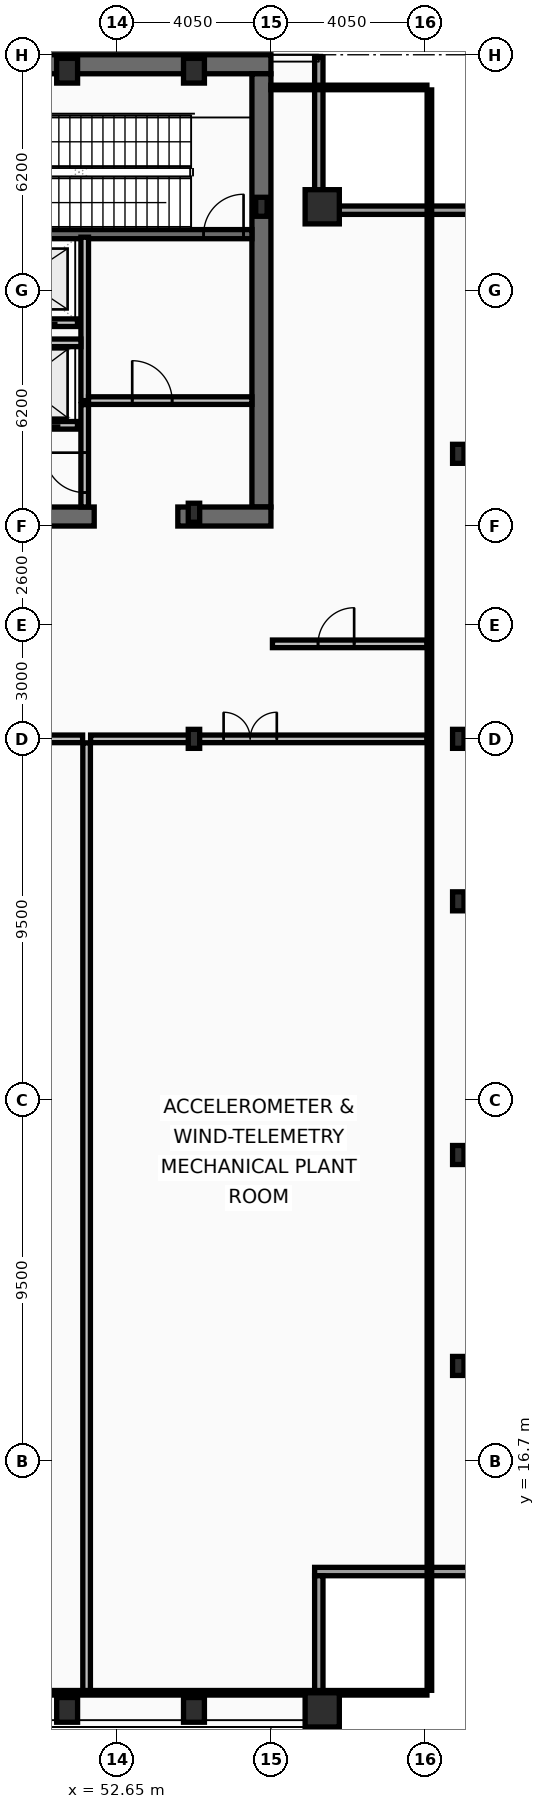
"""IFC4 building model, lengths in metres.
Left out: names, types, materials, properties, quantities, classifications, styles, units other than length and angle.
Written with IfcOpenShell. Run it as: python <this file> out.ifc"""

import sys

from ifc_helpers import new_model, si_unit, direction, frame, frame_2d, origin, origin_2d, place, context, subcontext, project, spatial, rectangle, hollow_rectangle, i_section, extrude, element, fill, save


model = new_model("IFC4")
c1 = context("Model", 3, precision=1e-05, world=origin(), true_north=direction((0.0, 1.0)))
c2 = subcontext(c1, "Body", "Model", "MODEL_VIEW")
j1 = project(units=[si_unit("LENGTHUNIT", "METRE"), si_unit("PLANEANGLEUNIT", "RADIAN")], contexts=[c1])
p1 = place(None, origin())
s1 = spatial("IfcSite", under=j1, at=p1, CompositionType="ELEMENT")
p2 = place(p1, origin())
s2 = spatial("IfcBuilding", under=s1, at=p2, CompositionType="ELEMENT")
p3 = place(p2, frame((0.0, 0.0, 356.2)))
s3 = spatial("IfcBuildingStorey", under=s2, at=p3, CompositionType="ELEMENT", Elevation=356.2)
p4 = place(p3, frame((16.2, 53.45, 0.0), z_axis=(0.0, 0.0, 1.0), x_axis=(1.0, 0.0, 0.0)))
e1 = element("IfcWall", 1, at=p4, inside=s3, PredefinedType="SHEAR", context=c2, shape_type="SweptSolid", body=[
    extrude(rectangle(XDim=40.5, YDim=0.5, at=frame_2d((20.25, 0.0))), origin(), (0.0, 0.0, 1.0), 5.4),
])
p5 = place(p3, frame((56.45, 53.2, 0.0), z_axis=(0.0, 0.0, 1.0), x_axis=(0.0, -1.0, 0.0)))
e2 = element("IfcWall", 2, at=p5, inside=s3, PredefinedType="SHEAR", context=c2, shape_type="SweptSolid", body=[
    extrude(rectangle(XDim=11.4, YDim=0.5, at=frame_2d((5.7, 0.0))), origin(), (0.0, 0.0, 1.0), 5.4),
])
p6 = place(p3, frame((52.05, 41.55, 0.0), z_axis=(0.0, 0.0, 1.0), x_axis=(-1.0, 0.0, 0.0)))
e3 = element("IfcWall", 3, at=p6, inside=s3, PredefinedType="SHEAR", context=c2, shape_type="SweptSolid", body=[
    extrude(rectangle(XDim=11.3, YDim=0.5, at=frame_2d((5.65, 0.0))), origin(), (0.0, 0.0, 1.0), 5.4),
])
p7 = place(p3, frame((56.7, 41.55, 0.0), z_axis=(0.0, 0.0, 1.0), x_axis=(-1.0, 0.0, 0.0)))
e4 = element("IfcWall", 4, at=p7, inside=s3, PredefinedType="SHEAR", context=c2, shape_type="SweptSolid", body=[
    extrude(rectangle(XDim=2.45, YDim=0.5, at=frame_2d((1.225, 0.0))), origin(), (0.0, 0.0, 1.0), 5.4),
])
p8 = place(p3, frame((48.63, 48.98, 0.0), z_axis=(0.0, 0.0, 1.0), x_axis=(1.0, 0.0, 0.0)))
e5 = element("IfcWall", 5, at=p8, inside=s3, PredefinedType="SHEAR", context=c2, shape_type="SweptSolid", body=[
    extrude(rectangle(XDim=7.57, YDim=0.24, at=frame_2d((3.785, 0.0))), origin(), (0.0, 0.0, 1.0), 5.4),
])
p9 = place(p8, frame((6.3, 0.0, 0.0)))
e6 = element("IfcOpeningElement", 6, at=p9, cuts=e5, PredefinedType="OPENING", context=c2, shape_type="SweptSolid", body=[
    extrude(rectangle(XDim=1.05, YDim=2.15, at=frame_2d((0.525, 1.075))), frame((0.0, 0.13, 0.0), z_axis=(0.0, -1.0, 0.0), x_axis=(1.0, 0.0, 0.0)), (0.0, 0.0, 1.0), 0.26),
])
for number, where, z_axis, x_axis in (
    (7, (58.05, 10.15, 0.0), (0.0, 0.0, 1.0), (1.0, 0.0, 0.0)),
    (8, (58.05, 49.7, 0.0), (0.0, 0.0, 1.0), (1.0, 0.0, 0.0)),
):
    element("IfcColumn", number, at=place(p3, frame(where, z_axis=z_axis, x_axis=x_axis)), inside=s3, PredefinedType="COLUMN", context=c2, shape_type="SweptSolid", body=[
        extrude(hollow_rectangle(XDim=0.9, YDim=0.9, WallThickness=0.05, at=origin_2d()), origin(), (0.0, 0.0, 1.0), 5.6),
    ])
for number, where, z_axis, x_axis in (
    (9, (51.337, 10.15, 0.0), (0.0, 0.0, 1.0), (1.0, 0.0, 0.0)),
    (10, (54.675, 10.15, 0.0), (0.0, 0.0, 1.0), (1.0, 0.0, 0.0)),
    (11, (51.337, 53.28, 0.0), (0.0, 0.0, 1.0), (1.0, 0.0, 0.0)),
    (12, (54.675, 53.28, 0.0), (0.0, 0.0, 1.0), (1.0, 0.0, 0.0)),
):
    element("IfcColumn", number, at=place(p3, frame(where, z_axis=z_axis, x_axis=x_axis)), inside=s3, PredefinedType="COLUMN", context=c2, shape_type="SweptSolid", body=[
        extrude(hollow_rectangle(XDim=0.55, YDim=0.65, WallThickness=0.04, at=origin_2d()), origin(), (0.0, 0.0, 1.0), 5.6),
    ])
for number, where, z_axis, x_axis in (
    (13, (61.63, 19.2, 0.0), (0.0, 0.0, 1.0), (1.0, 0.0, 0.0)),
    (14, (61.63, 24.75, 0.0), (0.0, 0.0, 1.0), (1.0, 0.0, 0.0)),
    (15, (61.63, 31.425, 0.0), (0.0, 0.0, 1.0), (1.0, 0.0, 0.0)),
    (16, (61.63, 35.7, 0.0), (0.0, 0.0, 1.0), (1.0, 0.0, 0.0)),
    (17, (61.63, 43.2, 0.0), (0.0, 0.0, 1.0), (1.0, 0.0, 0.0)),
    (18, (56.45, 49.7, 0.0), (0.0, 0.0, 1.0), (1.0, 0.0, 0.0)),
    (19, (54.675, 35.7, 0.0), (0.0, 0.0, 1.0), (1.0, 0.0, 0.0)),
    (20, (54.675, 41.65, 0.0), (0.0, 0.0, 1.0), (1.0, 0.0, 0.0)),
):
    element("IfcColumn", number, at=place(p3, frame(where, z_axis=z_axis, x_axis=x_axis)), inside=s3, PredefinedType="COLUMN", context=c2, shape_type="SweptSolid", body=[
        extrude(i_section(OverallWidth=0.3, OverallDepth=0.5, WebThickness=0.014, FlangeThickness=0.028, at=origin_2d()), origin(), (0.0, 0.0, 1.0), 5.6),
    ])
p10 = place(p3, frame((57.96, 53.63, 0.0), z_axis=(0.0, 0.0, 1.0), x_axis=(0.0, -1.0, 0.0)))
e21 = element("IfcWall", 21, at=p10, inside=s3, PredefinedType="SOLIDWALL", context=c2, shape_type="SweptSolid", body=[
    extrude(rectangle(XDim=3.91, YDim=0.22, at=frame_2d((1.955, 0.0))), origin(), (0.0, 0.0, 1.0), 4.84),
])
for number, where, z_axis, x_axis in (
    (22, (57.85, 49.61, 0.0), (0.0, 0.0, 1.0), (1.0, 0.0, 0.0)),
    (23, (61.98, 13.79, 0.0), (0.0, 0.0, 1.0), (-1.0, 0.0, 0.0)),
):
    element("IfcWall", number, at=place(p3, frame(where, z_axis=z_axis, x_axis=x_axis)), inside=s3, PredefinedType="SOLIDWALL", context=c2, shape_type="SweptSolid", body=[
        extrude(rectangle(XDim=4.13, YDim=0.22, at=frame_2d((2.065, 0.0))), origin(), (0.0, 0.0, 1.0), 4.84),
    ])
p11 = place(p3, frame((57.96, 13.68, 0.0), z_axis=(0.0, 0.0, 1.0), x_axis=(0.0, -1.0, 0.0)))
e24 = element("IfcWall", 24, at=p11, inside=s3, PredefinedType="SOLIDWALL", context=c2, shape_type="SweptSolid", body=[
    extrude(rectangle(XDim=3.91, YDim=0.22, at=frame_2d((1.955, 0.0))), origin(), (0.0, 0.0, 1.0), 4.84),
])
p12 = place(p3, frame((51.61, 43.95, 0.0), z_axis=(0.0, 0.0, 1.0), x_axis=(-1.0, 0.0, 0.0)))
e25 = element("IfcWall", 25, at=p12, inside=s3, PredefinedType="PARTITIONING", context=c2, shape_type="SweptSolid", body=[
    extrude(rectangle(XDim=2.92, YDim=0.2, at=frame_2d((1.46, 0.0))), origin(), (0.0, 0.0, 1.0), 5.4),
])
p13 = place(p12, frame((0.81, 0.0, 0.0)))
e26 = element("IfcOpeningElement", 26, at=p13, cuts=e25, PredefinedType="OPENING", context=c2, shape_type="SweptSolid", body=[
    extrude(rectangle(XDim=1.3, YDim=2.18, at=frame_2d((0.65, 1.09))), frame((0.0, 0.11, 0.0), z_axis=(0.0, -1.0, 0.0), x_axis=(1.0, 0.0, 0.0)), (0.0, 0.0, 1.0), 0.22),
])
p14 = place(p3, frame((51.61, 46.65, 0.0), z_axis=(0.0, 0.0, 1.0), x_axis=(-1.0, 0.0, 0.0)))
e27 = element("IfcWall", 27, at=p14, inside=s3, PredefinedType="PARTITIONING", context=c2, shape_type="SweptSolid", body=[
    extrude(rectangle(XDim=2.92, YDim=0.2, at=frame_2d((1.46, 0.0))), origin(), (0.0, 0.0, 1.0), 5.4),
])
p15 = place(p14, frame((0.86, 0.0, 0.0)))
e28 = element("IfcOpeningElement", 28, at=p15, cuts=e27, PredefinedType="OPENING", context=c2, shape_type="SweptSolid", body=[
    extrude(rectangle(XDim=1.2, YDim=2.18, at=frame_2d((0.6, 1.09))), frame((0.0, 0.11, 0.0), z_axis=(0.0, -1.0, 0.0), x_axis=(1.0, 0.0, 0.0)), (0.0, 0.0, 1.0), 0.22),
])
p16 = place(p3, frame((51.8, 44.6, 0.0), z_axis=(0.0, 0.0, 1.0), x_axis=(0.0, 1.0, 0.0)))
e29 = element("IfcWall", 29, at=p16, inside=s3, PredefinedType="PARTITIONING", context=c2, shape_type="SweptSolid", body=[
    extrude(rectangle(XDim=4.3, YDim=0.2, at=frame_2d((2.15, 0.0))), origin(), (0.0, 0.0, 1.0), 5.4),
])
p17 = place(p3, frame((51.9, 44.6, 0.0), z_axis=(0.0, 0.0, 1.0), x_axis=(1.0, 0.0, 0.0)))
e30 = element("IfcWall", 30, at=p17, inside=s3, PredefinedType="PARTITIONING", context=c2, shape_type="SweptSolid", body=[
    extrude(rectangle(XDim=4.3, YDim=0.2, at=frame_2d((2.15, 0.0))), origin(), (0.0, 0.0, 1.0), 5.4),
])
p18 = place(p17, frame((1.15, 0.0, 0.0)))
e31 = element("IfcOpeningElement", 31, at=p18, cuts=e30, PredefinedType="OPENING", context=c2, shape_type="SweptSolid", body=[
    extrude(rectangle(XDim=1.05, YDim=2.15, at=frame_2d((0.525, 1.075))), frame((0.0, 0.11, 0.0), z_axis=(0.0, -1.0, 0.0), x_axis=(1.0, 0.0, 0.0)), (0.0, 0.0, 1.0), 0.22),
])
p19 = place(p3, frame((48.63, 46.12, 0.0), z_axis=(0.0, 0.0, 1.0), x_axis=(1.0, 0.0, 0.0)))
e32 = element("IfcWall", 32, at=p19, inside=s3, PredefinedType="PARTITIONING", context=c2, shape_type="SweptSolid", body=[
    extrude(rectangle(XDim=3.07, YDim=0.2, at=frame_2d((1.535, 0.0))), origin(), (0.0, 0.0, 1.0), 5.4),
])
p20 = place(p3, frame((51.8, 41.8, 0.0), z_axis=(0.0, 0.0, 1.0), x_axis=(0.0, 1.0, 0.0)))
e33 = element("IfcWall", 33, at=p20, inside=s3, PredefinedType="PARTITIONING", context=c2, shape_type="SweptSolid", body=[
    extrude(rectangle(XDim=2.695, YDim=0.2, at=frame_2d((1.348, 0.0))), origin(), (0.0, 0.0, 1.0), 5.4),
])
p21 = place(p20, frame((0.38, 0.0, 0.0)))
e34 = element("IfcOpeningElement", 34, at=p21, cuts=e33, PredefinedType="OPENING", context=c2, shape_type="SweptSolid", body=[
    extrude(rectangle(XDim=1.05, YDim=2.15, at=frame_2d((0.525, 1.075))), frame((0.0, 0.11, 0.0), z_axis=(0.0, -1.0, 0.0), x_axis=(1.0, 0.0, 0.0)), (0.0, 0.0, 1.0), 0.22),
])
p22 = place(p3, frame((47.555, 35.7, 0.0), z_axis=(0.0, 0.0, 1.0), x_axis=(1.0, 0.0, 0.0)))
e35 = element("IfcWall", 35, at=p22, inside=s3, PredefinedType="PARTITIONING", context=c2, shape_type="SweptSolid", body=[
    extrude(rectangle(XDim=4.19, YDim=0.2, at=frame_2d((2.095, 0.0))), origin(), (0.0, 0.0, 1.0), 4.79),
])
p23 = place(p3, frame((51.955, 35.7, 0.0), z_axis=(0.0, 0.0, 1.0), x_axis=(1.0, 0.0, 0.0)))
e36 = element("IfcWall", 36, at=p23, inside=s3, PredefinedType="PARTITIONING", context=c2, shape_type="SweptSolid", body=[
    extrude(rectangle(XDim=8.85, YDim=0.2, at=frame_2d((4.425, 0.0))), origin(), (0.0, 0.0, 1.0), 4.79),
])
p24 = place(p23, frame((3.5, 0.0, 0.0)))
e37 = element("IfcOpeningElement", 37, at=p24, cuts=e36, PredefinedType="OPENING", context=c2, shape_type="SweptSolid", body=[
    extrude(rectangle(XDim=1.4, YDim=2.15, at=frame_2d((0.7, 1.075))), frame((0.0, 0.11, 0.0), z_axis=(0.0, -1.0, 0.0), x_axis=(1.0, 0.0, 0.0)), (0.0, 0.0, 1.0), 0.22),
])
p25 = place(p3, frame((51.85, 10.565, 0.0), z_axis=(0.0, 0.0, 1.0), x_axis=(0.0, 1.0, 0.0)))
e38 = element("IfcWall", 38, at=p25, inside=s3, PredefinedType="PARTITIONING", context=c2, shape_type="SweptSolid", body=[
    extrude(rectangle(XDim=25.03, YDim=0.2, at=frame_2d((12.515, 0.0))), origin(), (0.0, 0.0, 1.0), 4.84),
])
p26 = place(p3, frame((56.74, 38.2, 0.0), z_axis=(0.0, 0.0, 1.0), x_axis=(1.0, 0.0, 0.0)))
e39 = element("IfcWall", 39, at=p26, inside=s3, PredefinedType="PARTITIONING", context=c2, shape_type="SweptSolid", body=[
    extrude(rectangle(XDim=4.065, YDim=0.2, at=frame_2d((2.032, 0.0))), origin(), (0.0, 0.0, 1.0), 5.4),
])
p27 = place(p26, frame((1.2, 0.0, 0.0)))
e40 = element("IfcOpeningElement", 40, at=p27, cuts=e39, PredefinedType="OPENING", context=c2, shape_type="SweptSolid", body=[
    extrude(rectangle(XDim=0.95, YDim=2.1, at=frame_2d((0.475, 1.05))), frame((0.0, 0.11, 0.0), z_axis=(0.0, -1.0, 0.0), x_axis=(1.0, 0.0, 0.0)), (0.0, 0.0, 1.0), 0.22),
])
p28 = place(p3, frame((60.87, 10.665, 0.0), z_axis=(0.0, 0.0, 1.0), x_axis=(0.0, 1.0, 0.0)))
e41 = element("IfcWall", 41, at=p28, inside=s3, PredefinedType="PARTITIONING", context=c2, shape_type="SweptSolid", body=[
    extrude(rectangle(XDim=42.11, YDim=0.12, at=frame_2d((21.055, 0.0))), origin(), (0.0, 0.0, 1.0), 4.79),
])
p29 = place(p3, frame((56.7, 52.84, 0.0), z_axis=(0.0, 0.0, 1.0), x_axis=(1.0, 0.0, 0.0)))
e42 = element("IfcWall", 42, at=p29, inside=s3, PredefinedType="PARTITIONING", context=c2, shape_type="SweptSolid", body=[
    extrude(rectangle(XDim=4.105, YDim=0.12, at=frame_2d((2.052, 0.0))), origin(), (0.0, 0.0, 1.0), 5.4),
])
p30 = place(p3, frame((12.095, 10.6, 0.0), z_axis=(0.0, 0.0, 1.0), x_axis=(1.0, 0.0, 0.0)))
e43 = element("IfcWall", 43, at=p30, inside=s3, PredefinedType="PARTITIONING", context=c2, shape_type="SweptSolid", body=[
    extrude(rectangle(XDim=48.71, YDim=0.12, at=frame_2d((24.355, 0.0))), origin(), (0.0, 0.0, 1.0), 4.79),
])
p31 = place(p9, origin())
e44 = element("IfcDoor", 44, at=p31, inside=s3, OperationType="SINGLE_SWING_RIGHT", PredefinedType="DOOR", context=c2, shape_type="SweptSolid", body=[
    extrude(rectangle(XDim=1.05, YDim=2.15, at=frame_2d((0.525, 1.075))), frame((0.0, 0.025, 0.0), z_axis=(0.0, -1.0, 0.0), x_axis=(1.0, 0.0, 0.0)), (0.0, 0.0, 1.0), 0.05),
])
fill(e6, e44)
p32 = place(p18, origin())
e45 = element("IfcDoor", 45, at=p32, inside=s3, OperationType="SINGLE_SWING_LEFT", PredefinedType="DOOR", context=c2, shape_type="SweptSolid", body=[
    extrude(rectangle(XDim=1.05, YDim=2.15, at=frame_2d((0.525, 1.075))), frame((0.0, 0.025, 0.0), z_axis=(0.0, -1.0, 0.0), x_axis=(1.0, 0.0, 0.0)), (0.0, 0.0, 1.0), 0.05),
])
fill(e31, e45)
p33 = place(p21, origin())
e46 = element("IfcDoor", 46, at=p33, inside=s3, OperationType="SINGLE_SWING_RIGHT", PredefinedType="DOOR", context=c2, shape_type="SweptSolid", body=[
    extrude(rectangle(XDim=1.05, YDim=2.15, at=frame_2d((0.525, 1.075))), frame((0.0, 0.025, 0.0), z_axis=(0.0, -1.0, 0.0), x_axis=(1.0, 0.0, 0.0)), (0.0, 0.0, 1.0), 0.05),
])
fill(e34, e46)
p34 = place(p24, origin())
e47 = element("IfcDoor", 47, at=p34, inside=s3, OperationType="DOUBLE_DOOR_SINGLE_SWING", PredefinedType="DOOR", context=c2, shape_type="SweptSolid", body=[
    extrude(rectangle(XDim=1.4, YDim=2.15, at=frame_2d((0.7, 1.075))), frame((0.0, 0.025, 0.0), z_axis=(0.0, -1.0, 0.0), x_axis=(1.0, 0.0, 0.0)), (0.0, 0.0, 1.0), 0.05),
])
fill(e37, e47)
p35 = place(p27, origin())
e48 = element("IfcDoor", 48, at=p35, inside=s3, OperationType="SINGLE_SWING_RIGHT", PredefinedType="DOOR", context=c2, shape_type="SweptSolid", body=[
    extrude(rectangle(XDim=0.95, YDim=2.1, at=frame_2d((0.475, 1.05))), frame((0.0, 0.025, 0.0), z_axis=(0.0, -1.0, 0.0), x_axis=(1.0, 0.0, 0.0)), (0.0, 0.0, 1.0), 0.05),
])
fill(e40, e48)
save(model, sys.argv[1])
